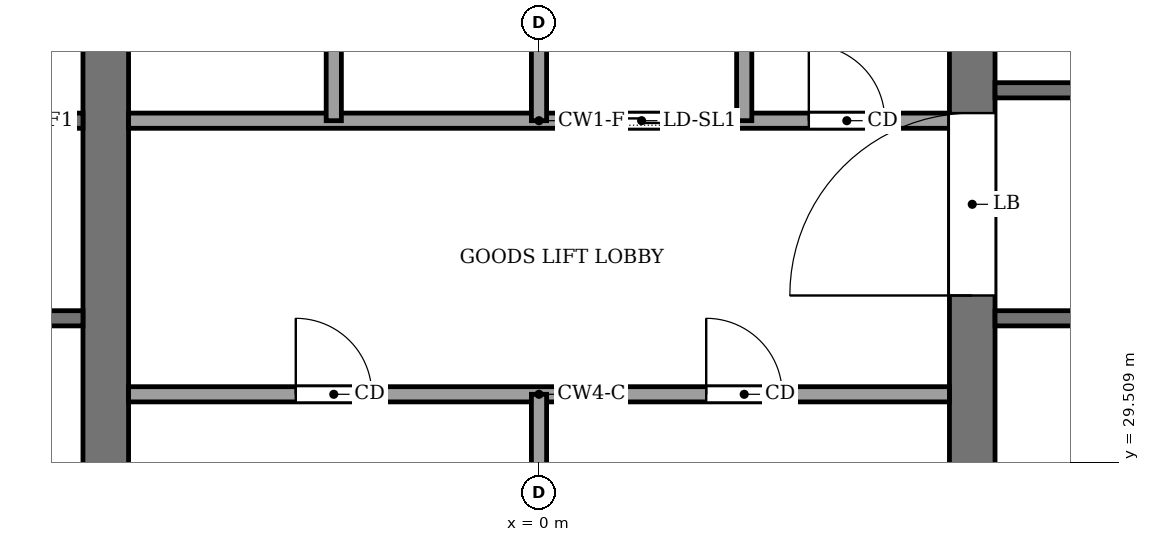
"""IFC4 building model, lengths in metres.
Left out: names, types, materials, properties, quantities, classifications, styles, units other than length and angle.
Written with IfcOpenShell. Run it as: python <this file> out.ifc"""

import sys

from ifc_helpers import new_model, si_unit, direction, frame, frame_2d, origin, place, context, subcontext, project, spatial, rectangle, extrude, element, fill, save


model = new_model("IFC4")
c1 = context("Model", 3, precision=1e-05, world=origin(), true_north=direction((0.0, 1.0)))
c2 = subcontext(c1, "Body", "Model", "MODEL_VIEW")
j1 = project(units=[si_unit("LENGTHUNIT", "METRE"), si_unit("PLANEANGLEUNIT", "RADIAN")], contexts=[c1])
p1 = place(None, origin())
s1 = spatial("IfcSite", under=j1, at=p1, CompositionType="ELEMENT")
p2 = place(p1, origin())
s2 = spatial("IfcBuilding", under=s1, at=p2, CompositionType="ELEMENT")
p3 = place(p2, frame((0.0, 0.0, 218.0)))
s3 = spatial("IfcBuildingStorey", under=s2, at=p3, CompositionType="ELEMENT", Elevation=218.0)
p4 = place(p3, frame((-5.7, 18.4, -0.13), z_axis=(0.0, 0.0, 1.0), x_axis=(0.0, 1.0, 0.0)))
e1 = element("IfcWall", 1, at=p4, inside=s3, PredefinedType="SHEAR", context=c2, shape_type="SweptSolid", body=[
    extrude(rectangle(XDim=19.2, YDim=0.6, at=frame_2d((9.6, 0.0))), origin(), (0.0, 0.0, 1.0), 4.0),
])
p5 = place(p4, frame((8.35, 0.0, 0.13)))
e2 = element("IfcOpeningElement", 2, at=p5, cuts=e1, PredefinedType="OPENING", context=c2, shape_type="SweptSolid", body=[
    extrude(rectangle(XDim=0.9, YDim=2.1, at=frame_2d((0.45, 1.05))), frame((0.0, 0.31, 0.0), z_axis=(0.0, -1.0, 0.0), x_axis=(1.0, 0.0, 0.0)), (0.0, 0.0, 1.0), 0.62),
])
p6 = place(p3, frame((5.7, 18.4, -0.13), z_axis=(0.0, 0.0, 1.0), x_axis=(0.0, 1.0, 0.0)))
e3 = element("IfcWall", 3, at=p6, inside=s3, PredefinedType="SHEAR", context=c2, shape_type="SweptSolid", body=[
    extrude(rectangle(XDim=19.2, YDim=0.6, at=frame_2d((9.6, 0.0))), origin(), (0.0, 0.0, 1.0), 4.0),
])
p7 = place(p6, frame((8.35, 0.0, 0.13)))
e4 = element("IfcOpeningElement", 4, at=p7, cuts=e3, PredefinedType="OPENING", context=c2, shape_type="SweptSolid", body=[
    extrude(rectangle(XDim=0.9, YDim=2.1, at=frame_2d((0.45, 1.05))), frame((0.0, 0.31, 0.0), z_axis=(0.0, -1.0, 0.0), x_axis=(1.0, 0.0, 0.0)), (0.0, 0.0, 1.0), 0.62),
])
p8 = place(p6, frame((13.3, 0.0, 0.13)))
e5 = element("IfcOpeningElement", 5, at=p8, cuts=e3, PredefinedType="OPENING", context=c2, shape_type="SweptSolid", body=[
    extrude(rectangle(XDim=2.4, YDim=2.4, at=frame_2d((1.2, 1.2))), frame((0.0, 0.31, 0.0), z_axis=(0.0, -1.0, 0.0), x_axis=(1.0, 0.0, 0.0)), (0.0, 0.0, 1.0), 0.62),
])
p9 = place(p3, frame((-5.4, 30.4, 0.0), z_axis=(0.0, 0.0, 1.0), x_axis=(1.0, 0.0, 0.0)))
e6 = element("IfcWall", 6, at=p9, inside=s3, PredefinedType="PARTITIONING", context=c2, shape_type="SweptSolid", body=[
    extrude(rectangle(XDim=10.8, YDim=0.2, at=frame_2d((5.4, 0.0))), origin(), (0.0, 0.0, 1.0), 3.87),
])
p10 = place(p9, frame((2.2, 0.0, 0.0)))
e7 = element("IfcOpeningElement", 7, at=p10, cuts=e6, PredefinedType="OPENING", context=c2, shape_type="SweptSolid", body=[
    extrude(rectangle(XDim=1.0, YDim=2.1, at=frame_2d((0.5, 1.05))), frame((0.0, 0.11, 0.0), z_axis=(0.0, -1.0, 0.0), x_axis=(1.0, 0.0, 0.0)), (0.0, 0.0, 1.0), 0.22),
])
p11 = place(p9, frame((7.6, 0.0, 0.0)))
e8 = element("IfcOpeningElement", 8, at=p11, cuts=e6, PredefinedType="OPENING", context=c2, shape_type="SweptSolid", body=[
    extrude(rectangle(XDim=1.0, YDim=2.1, at=frame_2d((0.5, 1.05))), frame((0.0, 0.11, 0.0), z_axis=(0.0, -1.0, 0.0), x_axis=(1.0, 0.0, 0.0)), (0.0, 0.0, 1.0), 0.22),
])
p12 = place(p3, frame((-12.6, 31.4, 0.0), z_axis=(0.0, 0.0, 1.0), x_axis=(1.0, 0.0, 0.0)))
e9 = element("IfcWall", 9, at=p12, inside=s3, PredefinedType="PARTITIONING", context=c2, shape_type="SweptSolid", body=[
    extrude(rectangle(XDim=6.6, YDim=0.2, at=frame_2d((3.3, 0.0))), origin(), (0.0, 0.0, 1.0), 3.87),
])
p13 = place(p12, frame((1.0, 0.0, 0.0)))
e10 = element("IfcOpeningElement", 10, at=p13, cuts=e9, PredefinedType="OPENING", context=c2, shape_type="SweptSolid", body=[
    extrude(rectangle(XDim=1.2, YDim=2.2, at=frame_2d((0.6, 1.1))), frame((0.0, 0.11, 0.0), z_axis=(0.0, -1.0, 0.0), x_axis=(1.0, 0.0, 0.0)), (0.0, 0.0, 1.0), 0.22),
])
p14 = place(p3, frame((6.0, 31.4, 0.0), z_axis=(0.0, 0.0, 1.0), x_axis=(1.0, 0.0, 0.0)))
e11 = element("IfcWall", 11, at=p14, inside=s3, PredefinedType="PARTITIONING", context=c2, shape_type="SweptSolid", body=[
    extrude(rectangle(XDim=6.6, YDim=0.2, at=frame_2d((3.3, 0.0))), origin(), (0.0, 0.0, 1.0), 3.87),
])
p15 = place(p3, frame((-12.6, 34.0, 0.0), z_axis=(0.0, 0.0, 1.0), x_axis=(1.0, 0.0, 0.0)))
e12 = element("IfcWall", 12, at=p15, inside=s3, PredefinedType="PARTITIONING", context=c2, shape_type="SweptSolid", body=[
    extrude(rectangle(XDim=6.6, YDim=0.2, at=frame_2d((3.3, 0.0))), origin(), (0.0, 0.0, 1.0), 3.87),
])
p16 = place(p15, frame((4.7, 0.0, 0.0)))
e13 = element("IfcOpeningElement", 13, at=p16, cuts=e12, PredefinedType="OPENING", context=c2, shape_type="SweptSolid", body=[
    extrude(rectangle(XDim=1.4, YDim=2.2, at=frame_2d((0.7, 1.1))), frame((0.0, 0.11, 0.0), z_axis=(0.0, -1.0, 0.0), x_axis=(1.0, 0.0, 0.0)), (0.0, 0.0, 1.0), 0.22),
])
p17 = place(p15, frame((2.3, 0.0, 0.0)))
e14 = element("IfcOpeningElement", 14, at=p17, cuts=e12, PredefinedType="OPENING", context=c2, shape_type="SweptSolid", body=[
    extrude(rectangle(XDim=1.4, YDim=2.2, at=frame_2d((0.7, 1.1))), frame((0.0, 0.11, 0.0), z_axis=(0.0, -1.0, 0.0), x_axis=(1.0, 0.0, 0.0)), (0.0, 0.0, 1.0), 0.22),
])
p18 = place(p15, frame((0.45, 0.0, 0.0)))
e15 = element("IfcOpeningElement", 15, at=p18, cuts=e12, PredefinedType="OPENING", context=c2, shape_type="SweptSolid", body=[
    extrude(rectangle(XDim=0.9, YDim=2.1, at=frame_2d((0.45, 1.05))), frame((0.0, 0.11, 0.0), z_axis=(0.0, -1.0, 0.0), x_axis=(1.0, 0.0, 0.0)), (0.0, 0.0, 1.0), 0.22),
])
p19 = place(p3, frame((-5.4, 34.0, 0.0), z_axis=(0.0, 0.0, 1.0), x_axis=(1.0, 0.0, 0.0)))
e16 = element("IfcWall", 16, at=p19, inside=s3, PredefinedType="PARTITIONING", context=c2, shape_type="SweptSolid", body=[
    extrude(rectangle(XDim=10.8, YDim=0.2, at=frame_2d((5.4, 0.0))), origin(), (0.0, 0.0, 1.0), 3.87),
])
p20 = place(p19, frame((6.15, 0.0, 0.0)))
e17 = element("IfcOpeningElement", 17, at=p20, cuts=e16, PredefinedType="OPENING", context=c2, shape_type="SweptSolid", body=[
    extrude(rectangle(XDim=1.2, YDim=2.2, at=frame_2d((0.6, 1.1))), frame((0.0, 0.11, 0.0), z_axis=(0.0, -1.0, 0.0), x_axis=(1.0, 0.0, 0.0)), (0.0, 0.0, 1.0), 0.22),
])
p21 = place(p19, frame((8.95, 0.0, 0.0)))
e18 = element("IfcOpeningElement", 18, at=p21, cuts=e16, PredefinedType="OPENING", context=c2, shape_type="SweptSolid", body=[
    extrude(rectangle(XDim=1.0, YDim=2.1, at=frame_2d((0.5, 1.05))), frame((0.0, 0.11, 0.0), z_axis=(0.0, -1.0, 0.0), x_axis=(1.0, 0.0, 0.0)), (0.0, 0.0, 1.0), 0.22),
])
p22 = place(p3, frame((6.0, 34.4, 0.0), z_axis=(0.0, 0.0, 1.0), x_axis=(1.0, 0.0, 0.0)))
e19 = element("IfcWall", 19, at=p22, inside=s3, PredefinedType="PARTITIONING", context=c2, shape_type="SweptSolid", body=[
    extrude(rectangle(XDim=6.6, YDim=0.2, at=frame_2d((3.3, 0.0))), origin(), (0.0, 0.0, 1.0), 3.87),
])
p23 = place(p22, frame((4.8, 0.0, 0.0)))
e20 = element("IfcOpeningElement", 20, at=p23, cuts=e19, PredefinedType="OPENING", context=c2, shape_type="SweptSolid", body=[
    extrude(rectangle(XDim=1.2, YDim=2.2, at=frame_2d((0.6, 1.1))), frame((0.0, 0.11, 0.0), z_axis=(0.0, -1.0, 0.0), x_axis=(1.0, 0.0, 0.0)), (0.0, 0.0, 1.0), 0.22),
])
p24 = place(p3, frame((-2.7, 34.0, 0.0), z_axis=(0.0, 0.0, 1.0), x_axis=(0.0, 1.0, 0.0)))
e21 = element("IfcWall", 21, at=p24, inside=s3, PredefinedType="PARTITIONING", context=c2, shape_type="SweptSolid", body=[
    extrude(rectangle(XDim=3.6, YDim=0.2, at=frame_2d((1.8, 0.0))), origin(), (0.0, 0.0, 1.0), 3.87),
])
p25 = place(p3, frame((0.0, 24.0, 0.0), z_axis=(0.0, 0.0, 1.0), x_axis=(0.0, 1.0, 0.0)))
e22 = element("IfcWall", 22, at=p25, inside=s3, PredefinedType="PARTITIONING", context=c2, shape_type="SweptSolid", body=[
    extrude(rectangle(XDim=6.4, YDim=0.2, at=frame_2d((3.2, 0.0))), origin(), (0.0, 0.0, 1.0), 3.87),
])
for number, where, z_axis, x_axis in (
    (23, (0.0, 34.0, 0.0), (0.0, 0.0, 1.0), (0.0, 1.0, 0.0)),
    (24, (2.7, 34.0, 0.0), (0.0, 0.0, 1.0), (0.0, 1.0, 0.0)),
):
    element("IfcWall", number, at=place(p3, frame(where, z_axis=z_axis, x_axis=x_axis)), inside=s3, PredefinedType="PARTITIONING", context=c2, shape_type="SweptSolid", body=[
        extrude(rectangle(XDim=3.6, YDim=0.2, at=frame_2d((1.8, 0.0))), origin(), (0.0, 0.0, 1.0), 3.87),
    ])
p26 = place(p20, origin())
e25 = element("IfcDoor", 25, at=p26, inside=s3, OperationType="SLIDING_TO_LEFT", PredefinedType="DOOR", context=c2, shape_type="SweptSolid", body=[
    extrude(rectangle(XDim=1.2, YDim=2.2, at=frame_2d((0.6, 1.1))), frame((0.0, 0.025, 0.0), z_axis=(0.0, -1.0, 0.0), x_axis=(1.0, 0.0, 0.0)), (0.0, 0.0, 1.0), 0.05),
])
fill(e17, e25)
p27 = place(p10, origin())
e26 = element("IfcDoor", 26, at=p27, inside=s3, OperationType="SINGLE_SWING_LEFT", PredefinedType="DOOR", context=c2, shape_type="SweptSolid", body=[
    extrude(rectangle(XDim=1.0, YDim=2.1, at=frame_2d((0.5, 1.05))), frame((0.0, 0.025, 0.0), z_axis=(0.0, -1.0, 0.0), x_axis=(1.0, 0.0, 0.0)), (0.0, 0.0, 1.0), 0.05),
])
fill(e7, e26)
p28 = place(p11, origin())
e27 = element("IfcDoor", 27, at=p28, inside=s3, OperationType="SINGLE_SWING_RIGHT", PredefinedType="DOOR", context=c2, shape_type="SweptSolid", body=[
    extrude(rectangle(XDim=1.0, YDim=2.1, at=frame_2d((0.5, 1.05))), frame((0.0, 0.025, 0.0), z_axis=(0.0, -1.0, 0.0), x_axis=(1.0, 0.0, 0.0)), (0.0, 0.0, 1.0), 0.05),
])
fill(e8, e27)
p29 = place(p21, origin())
e28 = element("IfcDoor", 28, at=p29, inside=s3, OperationType="SINGLE_SWING_LEFT", PredefinedType="DOOR", context=c2, shape_type="SweptSolid", body=[
    extrude(rectangle(XDim=1.0, YDim=2.1, at=frame_2d((0.5, 1.05))), frame((0.0, 0.025, 0.0), z_axis=(0.0, -1.0, 0.0), x_axis=(1.0, 0.0, 0.0)), (0.0, 0.0, 1.0), 0.05),
])
fill(e18, e28)
p30 = place(p8, origin())
e29 = element("IfcDoor", 29, at=p30, inside=s3, OperationType="DOUBLE_DOOR_SINGLE_SWING", PredefinedType="DOOR", context=c2, shape_type="SweptSolid", body=[
    extrude(rectangle(XDim=2.4, YDim=2.4, at=frame_2d((1.2, 1.2))), frame((0.0, 0.025, 0.0), z_axis=(0.0, -1.0, 0.0), x_axis=(1.0, 0.0, 0.0)), (0.0, 0.0, 1.0), 0.05),
])
fill(e5, e29)
save(model, sys.argv[1])
